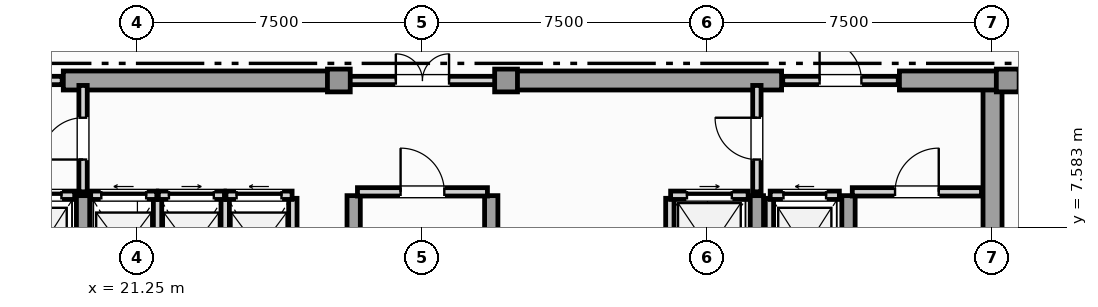
"""IFC4 building model, lengths in metres.
Left out: names, types, materials, properties, quantities, classifications, styles, units other than length and angle.
Written with IfcOpenShell. Run it as: python <this file> out.ifc"""

import sys

from ifc_helpers import new_model, si_unit, direction, frame, frame_2d, origin, origin_2d, place, context, subcontext, project, spatial, rectangle, extrude, element, fill, save


model = new_model("IFC4")
c1 = context("Model", 3, precision=1e-05, world=origin(), true_north=direction((0.0, 1.0)))
c2 = subcontext(c1, "Body", "Model", "MODEL_VIEW")
j1 = project(units=[si_unit("LENGTHUNIT", "METRE"), si_unit("PLANEANGLEUNIT", "RADIAN")], contexts=[c1])
p1 = place(None, origin())
s1 = spatial("IfcSite", under=j1, at=p1, CompositionType="ELEMENT")
p2 = place(p1, origin())
s2 = spatial("IfcBuilding", under=s1, at=p2, CompositionType="ELEMENT")
p3 = place(p2, frame((0.0, 0.0, 353.45)))
s3 = spatial("IfcBuildingStorey", under=s2, at=p3, CompositionType="ELEMENT", Elevation=353.45)
p4 = place(p3, frame((43.75, 0.92, 0.0), z_axis=(0.0, 0.0, 1.0), x_axis=(0.0, 1.0, 0.0)))
e1 = element("IfcWall", 1, at=p4, inside=s3, PredefinedType="SHEAR", context=c2, shape_type="SweptSolid", body=[
    extrude(rectangle(XDim=10.53, YDim=0.5, at=frame_2d((5.265, 0.0))), origin(), (0.0, 0.0, 1.0), 4.14),
])
for number, where, z_axis, x_axis in (
    (2, (19.3, 11.45, 0.0), (0.0, 0.0, 1.0), (1.0, 0.0, 0.0)),
    (3, (30.9, 11.45, 0.0), (0.0, 0.0, 1.0), (1.0, 0.0, 0.0)),
):
    element("IfcWall", number, at=place(p3, frame(where, z_axis=z_axis, x_axis=x_axis)), inside=s3, PredefinedType="SHEAR", context=c2, shape_type="SweptSolid", body=[
        extrude(rectangle(XDim=7.3, YDim=0.5, at=frame_2d((3.65, 0.0))), origin(), (0.0, 0.0, 1.0), 4.14),
    ])
p5 = place(p3, frame((41.3, 11.45, 0.0), z_axis=(0.0, 0.0, 1.0), x_axis=(1.0, 0.0, 0.0)))
e4 = element("IfcWall", 4, at=p5, inside=s3, PredefinedType="SHEAR", context=c2, shape_type="SweptSolid", body=[
    extrude(rectangle(XDim=2.95, YDim=0.5, at=frame_2d((1.475, 0.0))), origin(), (0.0, 0.0, 1.0), 4.14),
])
for number, where, z_axis, x_axis in (
    (5, (19.82, 0.92, 0.0), (0.0, 0.0, 1.0), (0.0, 1.0, 0.0)),
    (6, (26.94, 0.92, 0.0), (0.0, 0.0, 1.0), (0.0, 1.0, 0.0)),
    (7, (30.56, 0.92, 0.0), (0.0, 0.0, 1.0), (0.0, 1.0, 0.0)),
    (8, (37.55, 0.92, 0.0), (0.0, 0.0, 1.0), (0.0, 1.0, 0.0)),
    (9, (39.96, 0.92, 0.0), (0.0, 0.0, 1.0), (0.0, 1.0, 0.0)),
):
    element("IfcWall", number, at=place(p3, frame(where, z_axis=z_axis, x_axis=x_axis)), inside=s3, PredefinedType="SHEAR", context=c2, shape_type="SweptSolid", body=[
        extrude(rectangle(XDim=7.5, YDim=0.35, at=frame_2d((3.75, 0.0))), origin(), (0.0, 0.0, 1.0), 4.14),
    ])
for number, where, z_axis, x_axis in (
    (10, (44.15, 11.45, 0.0), (0.0, 0.0, 1.0), (1.0, 0.0, 0.0)),
    (11, (26.55, 11.45, 0.0), (0.0, 0.0, 1.0), (1.0, 0.0, 0.0)),
    (12, (30.95, 11.45, 0.0), (0.0, 0.0, 1.0), (1.0, 0.0, 0.0)),
):
    element("IfcColumn", number, at=place(p3, frame(where, z_axis=z_axis, x_axis=x_axis)), inside=s3, PredefinedType="COLUMN", context=c2, shape_type="SweptSolid", body=[
        extrude(rectangle(XDim=0.6, YDim=0.6, at=origin_2d()), origin(), (0.0, 0.0, 1.0), 4.4),
    ])
p6 = place(p3, frame((17.78, 8.43, 0.0), z_axis=(0.0, 0.0, 1.0), x_axis=(1.0, 0.0, 0.0)))
e13 = element("IfcWall", 13, at=p6, inside=s3, PredefinedType="SOLIDWALL", context=c2, shape_type="SweptSolid", body=[
    extrude(rectangle(XDim=1.82, YDim=0.22, at=frame_2d((0.91, 0.0))), origin(), (0.0, 0.0, 1.0), 4.14),
])
p7 = place(p6, frame((0.35, 0.0, 0.0)))
e14 = element("IfcOpeningElement", 14, at=p7, cuts=e13, PredefinedType="OPENING", context=c2, shape_type="SweptSolid", body=[
    extrude(rectangle(XDim=1.12, YDim=2.25, at=frame_2d((0.56, 1.125))), frame((0.0, 0.12, 0.0), z_axis=(0.0, -1.0, 0.0), x_axis=(1.0, 0.0, 0.0)), (0.0, 0.0, 1.0), 0.24),
])
p8 = place(p3, frame((37.88, 5.65, 0.0), z_axis=(0.0, 0.0, 1.0), x_axis=(0.0, 1.0, 0.0)))
e15 = element("IfcWall", 15, at=p8, inside=s3, PredefinedType="SOLIDWALL", context=c2, shape_type="SweptSolid", body=[
    extrude(rectangle(XDim=2.7, YDim=0.22, at=frame_2d((1.35, 0.0))), origin(), (0.0, 0.0, 1.0), 4.14),
])
p9 = place(p3, frame((37.9, 8.43, 0.0), z_axis=(0.0, 0.0, 1.0), x_axis=(1.0, 0.0, 0.0)))
e16 = element("IfcWall", 16, at=p9, inside=s3, PredefinedType="SOLIDWALL", context=c2, shape_type="SweptSolid", body=[
    extrude(rectangle(XDim=1.82, YDim=0.22, at=frame_2d((0.91, 0.0))), origin(), (0.0, 0.0, 1.0), 4.14),
])
p10 = place(p9, frame((0.35, 0.0, 0.0)))
e17 = element("IfcOpeningElement", 17, at=p10, cuts=e16, PredefinedType="OPENING", context=c2, shape_type="SweptSolid", body=[
    extrude(rectangle(XDim=1.12, YDim=2.25, at=frame_2d((0.56, 1.125))), frame((0.0, 0.12, 0.0), z_axis=(0.0, -1.0, 0.0), x_axis=(1.0, 0.0, 0.0)), (0.0, 0.0, 1.0), 0.24),
])
p11 = place(p3, frame((35.26, 5.65, 0.0), z_axis=(0.0, 0.0, 1.0), x_axis=(0.0, 1.0, 0.0)))
e18 = element("IfcWall", 18, at=p11, inside=s3, PredefinedType="SOLIDWALL", context=c2, shape_type="SweptSolid", body=[
    extrude(rectangle(XDim=2.7, YDim=0.22, at=frame_2d((1.35, 0.0))), origin(), (0.0, 0.0, 1.0), 4.14),
])
p12 = place(p3, frame((35.28, 8.43, 0.0), z_axis=(0.0, 0.0, 1.0), x_axis=(1.0, 0.0, 0.0)))
e19 = element("IfcWall", 19, at=p12, inside=s3, PredefinedType="SOLIDWALL", context=c2, shape_type="SweptSolid", body=[
    extrude(rectangle(XDim=2.04, YDim=0.22, at=frame_2d((1.02, 0.0))), origin(), (0.0, 0.0, 1.0), 4.14),
])
p13 = place(p12, frame((0.43, 0.0, 0.0)))
e20 = element("IfcOpeningElement", 20, at=p13, cuts=e19, PredefinedType="OPENING", context=c2, shape_type="SweptSolid", body=[
    extrude(rectangle(XDim=1.18, YDim=2.2, at=frame_2d((0.59, 1.1))), frame((0.0, 0.12, 0.0), z_axis=(0.0, -1.0, 0.0), x_axis=(1.0, 0.0, 0.0)), (0.0, 0.0, 1.0), 0.24),
])
p14 = place(p3, frame((21.78, 5.65, 0.0), z_axis=(0.0, 0.0, 1.0), x_axis=(0.0, 1.0, 0.0)))
e21 = element("IfcWall", 21, at=p14, inside=s3, PredefinedType="SOLIDWALL", context=c2, shape_type="SweptSolid", body=[
    extrude(rectangle(XDim=2.7, YDim=0.22, at=frame_2d((1.35, 0.0))), origin(), (0.0, 0.0, 1.0), 4.14),
])
p15 = place(p3, frame((20.02, 8.43, 0.0), z_axis=(0.0, 0.0, 1.0), x_axis=(1.0, 0.0, 0.0)))
e22 = element("IfcWall", 22, at=p15, inside=s3, PredefinedType="SOLIDWALL", context=c2, shape_type="SweptSolid", body=[
    extrude(rectangle(XDim=1.74, YDim=0.22, at=frame_2d((0.87, 0.0))), origin(), (0.0, 0.0, 1.0), 4.14),
])
p16 = place(p15, frame((0.28, 0.0, 0.0)))
e23 = element("IfcOpeningElement", 23, at=p16, cuts=e22, PredefinedType="OPENING", context=c2, shape_type="SweptSolid", body=[
    extrude(rectangle(XDim=1.18, YDim=2.2, at=frame_2d((0.59, 1.1))), frame((0.0, 0.12, 0.0), z_axis=(0.0, -1.0, 0.0), x_axis=(1.0, 0.0, 0.0)), (0.0, 0.0, 1.0), 0.24),
])
p17 = place(p3, frame((23.56, 5.65, 0.0), z_axis=(0.0, 0.0, 1.0), x_axis=(0.0, 1.0, 0.0)))
e24 = element("IfcWall", 24, at=p17, inside=s3, PredefinedType="SOLIDWALL", context=c2, shape_type="SweptSolid", body=[
    extrude(rectangle(XDim=2.7, YDim=0.22, at=frame_2d((1.35, 0.0))), origin(), (0.0, 0.0, 1.0), 4.14),
])
p18 = place(p3, frame((21.8, 8.43, 0.0), z_axis=(0.0, 0.0, 1.0), x_axis=(1.0, 0.0, 0.0)))
e25 = element("IfcWall", 25, at=p18, inside=s3, PredefinedType="SOLIDWALL", context=c2, shape_type="SweptSolid", body=[
    extrude(rectangle(XDim=1.74, YDim=0.22, at=frame_2d((0.87, 0.0))), origin(), (0.0, 0.0, 1.0), 4.14),
])
p19 = place(p18, frame((0.28, 0.0, 0.0)))
e26 = element("IfcOpeningElement", 26, at=p19, cuts=e25, PredefinedType="OPENING", context=c2, shape_type="SweptSolid", body=[
    extrude(rectangle(XDim=1.18, YDim=2.2, at=frame_2d((0.59, 1.1))), frame((0.0, 0.12, 0.0), z_axis=(0.0, -1.0, 0.0), x_axis=(1.0, 0.0, 0.0)), (0.0, 0.0, 1.0), 0.24),
])
p20 = place(p3, frame((25.34, 5.65, 0.0), z_axis=(0.0, 0.0, 1.0), x_axis=(0.0, 1.0, 0.0)))
e27 = element("IfcWall", 27, at=p20, inside=s3, PredefinedType="SOLIDWALL", context=c2, shape_type="SweptSolid", body=[
    extrude(rectangle(XDim=2.7, YDim=0.22, at=frame_2d((1.35, 0.0))), origin(), (0.0, 0.0, 1.0), 4.14),
])
p21 = place(p3, frame((23.58, 8.43, 0.0), z_axis=(0.0, 0.0, 1.0), x_axis=(1.0, 0.0, 0.0)))
e28 = element("IfcWall", 28, at=p21, inside=s3, PredefinedType="SOLIDWALL", context=c2, shape_type="SweptSolid", body=[
    extrude(rectangle(XDim=1.74, YDim=0.22, at=frame_2d((0.87, 0.0))), origin(), (0.0, 0.0, 1.0), 4.14),
])
p22 = place(p21, frame((0.28, 0.0, 0.0)))
e29 = element("IfcOpeningElement", 29, at=p22, cuts=e28, PredefinedType="OPENING", context=c2, shape_type="SweptSolid", body=[
    extrude(rectangle(XDim=1.18, YDim=2.2, at=frame_2d((0.59, 1.1))), frame((0.0, 0.12, 0.0), z_axis=(0.0, -1.0, 0.0), x_axis=(1.0, 0.0, 0.0)), (0.0, 0.0, 1.0), 0.24),
])
p23 = place(p3, frame((40.06, 8.52, 0.0), z_axis=(0.0, 0.0, 1.0), x_axis=(1.0, 0.0, 0.0)))
e30 = element("IfcWall", 30, at=p23, inside=s3, PredefinedType="SOLIDWALL", context=c2, shape_type="SweptSolid", body=[
    extrude(rectangle(XDim=3.4, YDim=0.22, at=frame_2d((1.7, 0.0))), origin(), (0.0, 0.0, 1.0), 4.14),
])
p24 = place(p23, frame((1.125, 0.0, 0.0)))
e31 = element("IfcOpeningElement", 31, at=p24, cuts=e30, PredefinedType="OPENING", context=c2, shape_type="SweptSolid", body=[
    extrude(rectangle(XDim=1.15, YDim=2.2, at=frame_2d((0.575, 1.1))), frame((0.0, 0.12, 0.0), z_axis=(0.0, -1.0, 0.0), x_axis=(1.0, 0.0, 0.0)), (0.0, 0.0, 1.0), 0.24),
])
p25 = place(p3, frame((27.04, 8.52, 0.0), z_axis=(0.0, 0.0, 1.0), x_axis=(1.0, 0.0, 0.0)))
e32 = element("IfcWall", 32, at=p25, inside=s3, PredefinedType="SOLIDWALL", context=c2, shape_type="SweptSolid", body=[
    extrude(rectangle(XDim=3.42, YDim=0.22, at=frame_2d((1.71, 0.0))), origin(), (0.0, 0.0, 1.0), 4.14),
])
p26 = place(p25, frame((1.135, 0.0, 0.0)))
e33 = element("IfcOpeningElement", 33, at=p26, cuts=e32, PredefinedType="OPENING", context=c2, shape_type="SweptSolid", body=[
    extrude(rectangle(XDim=1.15, YDim=2.2, at=frame_2d((0.575, 1.1))), frame((0.0, 0.12, 0.0), z_axis=(0.0, -1.0, 0.0), x_axis=(1.0, 0.0, 0.0)), (0.0, 0.0, 1.0), 0.24),
])
p27 = place(p3, frame((19.82, 8.52, 0.0), z_axis=(0.0, 0.0, 1.0), x_axis=(0.0, 1.0, 0.0)))
e34 = element("IfcWall", 34, at=p27, inside=s3, PredefinedType="SOLIDWALL", context=c2, shape_type="SweptSolid", body=[
    extrude(rectangle(XDim=2.8, YDim=0.22, at=frame_2d((1.4, 0.0))), origin(), (0.0, 0.0, 1.0), 3.595),
])
p28 = place(p27, frame((0.85, 0.0, 0.0)))
e35 = element("IfcOpeningElement", 35, at=p28, cuts=e34, PredefinedType="OPENING", context=c2, shape_type="SweptSolid", body=[
    extrude(rectangle(XDim=1.1, YDim=2.2, at=frame_2d((0.55, 1.1))), frame((0.0, 0.12, 0.0), z_axis=(0.0, -1.0, 0.0), x_axis=(1.0, 0.0, 0.0)), (0.0, 0.0, 1.0), 0.24),
])
p29 = place(p3, frame((37.55, 8.52, 0.0), z_axis=(0.0, 0.0, 1.0), x_axis=(0.0, 1.0, 0.0)))
e36 = element("IfcWall", 36, at=p29, inside=s3, PredefinedType="SOLIDWALL", context=c2, shape_type="SweptSolid", body=[
    extrude(rectangle(XDim=2.8, YDim=0.22, at=frame_2d((1.4, 0.0))), origin(), (0.0, 0.0, 1.0), 3.595),
])
p30 = place(p29, frame((0.85, 0.0, 0.0)))
e37 = element("IfcOpeningElement", 37, at=p30, cuts=e36, PredefinedType="OPENING", context=c2, shape_type="SweptSolid", body=[
    extrude(rectangle(XDim=1.1, YDim=2.2, at=frame_2d((0.55, 1.1))), frame((0.0, 0.12, 0.0), z_axis=(0.0, -1.0, 0.0), x_axis=(1.0, 0.0, 0.0)), (0.0, 0.0, 1.0), 0.24),
])
p31 = place(p3, frame((16.23, 11.45, 0.0), z_axis=(0.0, 0.0, 1.0), x_axis=(1.0, 0.0, 0.0)))
e38 = element("IfcWall", 38, at=p31, inside=s3, PredefinedType="SOLIDWALL", context=c2, shape_type="SweptSolid", body=[
    extrude(rectangle(XDim=3.04, YDim=0.22, at=frame_2d((1.52, 0.0))), origin(), (0.0, 0.0, 1.0), 4.14),
])
p32 = place(p31, frame((0.97, 0.0, 0.0)))
e39 = element("IfcOpeningElement", 39, at=p32, cuts=e38, PredefinedType="OPENING", context=c2, shape_type="SweptSolid", body=[
    extrude(rectangle(XDim=1.1, YDim=2.2, at=frame_2d((0.55, 1.1))), frame((0.0, 0.12, 0.0), z_axis=(0.0, -1.0, 0.0), x_axis=(1.0, 0.0, 0.0)), (0.0, 0.0, 1.0), 0.24),
])
p33 = place(p3, frame((26.63, 11.45, 0.0), z_axis=(0.0, 0.0, 1.0), x_axis=(1.0, 0.0, 0.0)))
e40 = element("IfcWall", 40, at=p33, inside=s3, PredefinedType="SOLIDWALL", context=c2, shape_type="SweptSolid", body=[
    extrude(rectangle(XDim=4.24, YDim=0.22, at=frame_2d((2.12, 0.0))), origin(), (0.0, 0.0, 1.0), 4.14),
])
p34 = place(p33, frame((1.42, 0.0, 0.0)))
e41 = element("IfcOpeningElement", 41, at=p34, cuts=e40, PredefinedType="OPENING", context=c2, shape_type="SweptSolid", body=[
    extrude(rectangle(XDim=1.4, YDim=2.2, at=frame_2d((0.7, 1.1))), frame((0.0, 0.12, 0.0), z_axis=(0.0, -1.0, 0.0), x_axis=(1.0, 0.0, 0.0)), (0.0, 0.0, 1.0), 0.24),
])
p35 = place(p3, frame((38.23, 11.45, 0.0), z_axis=(0.0, 0.0, 1.0), x_axis=(1.0, 0.0, 0.0)))
e42 = element("IfcWall", 42, at=p35, inside=s3, PredefinedType="SOLIDWALL", context=c2, shape_type="SweptSolid", body=[
    extrude(rectangle(XDim=3.04, YDim=0.22, at=frame_2d((1.52, 0.0))), origin(), (0.0, 0.0, 1.0), 4.14),
])
p36 = place(p35, frame((0.97, 0.0, 0.0)))
e43 = element("IfcOpeningElement", 43, at=p36, cuts=e42, PredefinedType="OPENING", context=c2, shape_type="SweptSolid", body=[
    extrude(rectangle(XDim=1.1, YDim=2.2, at=frame_2d((0.55, 1.1))), frame((0.0, 0.12, 0.0), z_axis=(0.0, -1.0, 0.0), x_axis=(1.0, 0.0, 0.0)), (0.0, 0.0, 1.0), 0.24),
])
p37 = place(p3, frame((44.355, 11.6, 0.0), z_axis=(0.0, 0.0, 1.0), x_axis=(1.0, 0.0, 0.0)))
e44 = element("IfcWall", 44, at=p37, inside=s3, PredefinedType="PARTITIONING", context=c2, shape_type="SweptSolid", body=[
    extrude(rectangle(XDim=3.363, YDim=0.18, at=frame_2d((1.681, 0.0))), origin(), (0.0, 0.0, 1.0), 4.14),
])
p38 = place(p37, frame((1.181, 0.0, 0.0)))
e45 = element("IfcOpeningElement", 45, at=p38, cuts=e44, PredefinedType="OPENING", context=c2, shape_type="SweptSolid", body=[
    extrude(rectangle(XDim=1.0, YDim=2.15, at=frame_2d((0.5, 1.075))), frame((0.0, 0.1, 0.0), z_axis=(0.0, -1.0, 0.0), x_axis=(1.0, 0.0, 0.0)), (0.0, 0.0, 1.0), 0.2),
])
p39 = place(p7, origin())
e46 = element("IfcDoor", 46, at=p39, inside=s3, OperationType="SLIDING_TO_RIGHT", PredefinedType="DOOR", context=c2, shape_type="SweptSolid", body=[
    extrude(rectangle(XDim=1.12, YDim=2.25, at=frame_2d((0.56, 1.125))), frame((0.0, 0.025, 0.0), z_axis=(0.0, -1.0, 0.0), x_axis=(1.0, 0.0, 0.0)), (0.0, 0.0, 1.0), 0.05),
])
fill(e14, e46)
p40 = place(p10, origin())
e47 = element("IfcDoor", 47, at=p40, inside=s3, OperationType="SLIDING_TO_LEFT", PredefinedType="DOOR", context=c2, shape_type="SweptSolid", body=[
    extrude(rectangle(XDim=1.12, YDim=2.25, at=frame_2d((0.56, 1.125))), frame((0.0, 0.025, 0.0), z_axis=(0.0, -1.0, 0.0), x_axis=(1.0, 0.0, 0.0)), (0.0, 0.0, 1.0), 0.05),
])
fill(e17, e47)
p41 = place(p13, origin())
e48 = element("IfcDoor", 48, at=p41, inside=s3, OperationType="SLIDING_TO_RIGHT", PredefinedType="DOOR", context=c2, shape_type="SweptSolid", body=[
    extrude(rectangle(XDim=1.18, YDim=2.2, at=frame_2d((0.59, 1.1))), frame((0.0, 0.025, 0.0), z_axis=(0.0, -1.0, 0.0), x_axis=(1.0, 0.0, 0.0)), (0.0, 0.0, 1.0), 0.05),
])
fill(e20, e48)
p42 = place(p16, origin())
e49 = element("IfcDoor", 49, at=p42, inside=s3, OperationType="SLIDING_TO_LEFT", PredefinedType="DOOR", context=c2, shape_type="SweptSolid", body=[
    extrude(rectangle(XDim=1.18, YDim=2.2, at=frame_2d((0.59, 1.1))), frame((0.0, 0.025, 0.0), z_axis=(0.0, -1.0, 0.0), x_axis=(1.0, 0.0, 0.0)), (0.0, 0.0, 1.0), 0.05),
])
fill(e23, e49)
p43 = place(p19, origin())
e50 = element("IfcDoor", 50, at=p43, inside=s3, OperationType="SLIDING_TO_RIGHT", PredefinedType="DOOR", context=c2, shape_type="SweptSolid", body=[
    extrude(rectangle(XDim=1.18, YDim=2.2, at=frame_2d((0.59, 1.1))), frame((0.0, 0.025, 0.0), z_axis=(0.0, -1.0, 0.0), x_axis=(1.0, 0.0, 0.0)), (0.0, 0.0, 1.0), 0.05),
])
fill(e26, e50)
p44 = place(p22, origin())
e51 = element("IfcDoor", 51, at=p44, inside=s3, OperationType="SLIDING_TO_LEFT", PredefinedType="DOOR", context=c2, shape_type="SweptSolid", body=[
    extrude(rectangle(XDim=1.18, YDim=2.2, at=frame_2d((0.59, 1.1))), frame((0.0, 0.025, 0.0), z_axis=(0.0, -1.0, 0.0), x_axis=(1.0, 0.0, 0.0)), (0.0, 0.0, 1.0), 0.05),
])
fill(e29, e51)
p45 = place(p24, origin())
e52 = element("IfcDoor", 52, at=p45, inside=s3, OperationType="SINGLE_SWING_RIGHT", PredefinedType="DOOR", context=c2, shape_type="SweptSolid", body=[
    extrude(rectangle(XDim=1.15, YDim=2.2, at=frame_2d((0.575, 1.1))), frame((0.0, 0.025, 0.0), z_axis=(0.0, -1.0, 0.0), x_axis=(1.0, 0.0, 0.0)), (0.0, 0.0, 1.0), 0.05),
])
fill(e31, e52)
p46 = place(p26, origin())
e53 = element("IfcDoor", 53, at=p46, inside=s3, OperationType="SINGLE_SWING_LEFT", PredefinedType="DOOR", context=c2, shape_type="SweptSolid", body=[
    extrude(rectangle(XDim=1.15, YDim=2.2, at=frame_2d((0.575, 1.1))), frame((0.0, 0.025, 0.0), z_axis=(0.0, -1.0, 0.0), x_axis=(1.0, 0.0, 0.0)), (0.0, 0.0, 1.0), 0.05),
])
fill(e33, e53)
p47 = place(p28, origin())
e54 = element("IfcDoor", 54, at=p47, inside=s3, OperationType="SINGLE_SWING_LEFT", PredefinedType="DOOR", context=c2, shape_type="SweptSolid", body=[
    extrude(rectangle(XDim=1.1, YDim=2.2, at=frame_2d((0.55, 1.1))), frame((0.0, 0.025, 0.0), z_axis=(0.0, -1.0, 0.0), x_axis=(1.0, 0.0, 0.0)), (0.0, 0.0, 1.0), 0.05),
])
fill(e35, e54)
p48 = place(p30, origin())
e55 = element("IfcDoor", 55, at=p48, inside=s3, OperationType="SINGLE_SWING_RIGHT", PredefinedType="DOOR", context=c2, shape_type="SweptSolid", body=[
    extrude(rectangle(XDim=1.1, YDim=2.2, at=frame_2d((0.55, 1.1))), frame((0.0, 0.025, 0.0), z_axis=(0.0, -1.0, 0.0), x_axis=(1.0, 0.0, 0.0)), (0.0, 0.0, 1.0), 0.05),
])
fill(e37, e55)
p49 = place(p34, origin())
e56 = element("IfcDoor", 56, at=p49, inside=s3, OperationType="DOUBLE_DOOR_SINGLE_SWING", PredefinedType="DOOR", context=c2, shape_type="SweptSolid", body=[
    extrude(rectangle(XDim=1.4, YDim=2.2, at=frame_2d((0.7, 1.1))), frame((0.0, 0.025, 0.0), z_axis=(0.0, -1.0, 0.0), x_axis=(1.0, 0.0, 0.0)), (0.0, 0.0, 1.0), 0.05),
])
fill(e41, e56)
p50 = place(p36, origin())
e57 = element("IfcDoor", 57, at=p50, inside=s3, OperationType="SINGLE_SWING_LEFT", PredefinedType="DOOR", context=c2, shape_type="SweptSolid", body=[
    extrude(rectangle(XDim=1.1, YDim=2.2, at=frame_2d((0.55, 1.1))), frame((0.0, 0.025, 0.0), z_axis=(0.0, -1.0, 0.0), x_axis=(1.0, 0.0, 0.0)), (0.0, 0.0, 1.0), 0.05),
])
fill(e43, e57)
save(model, sys.argv[1])
